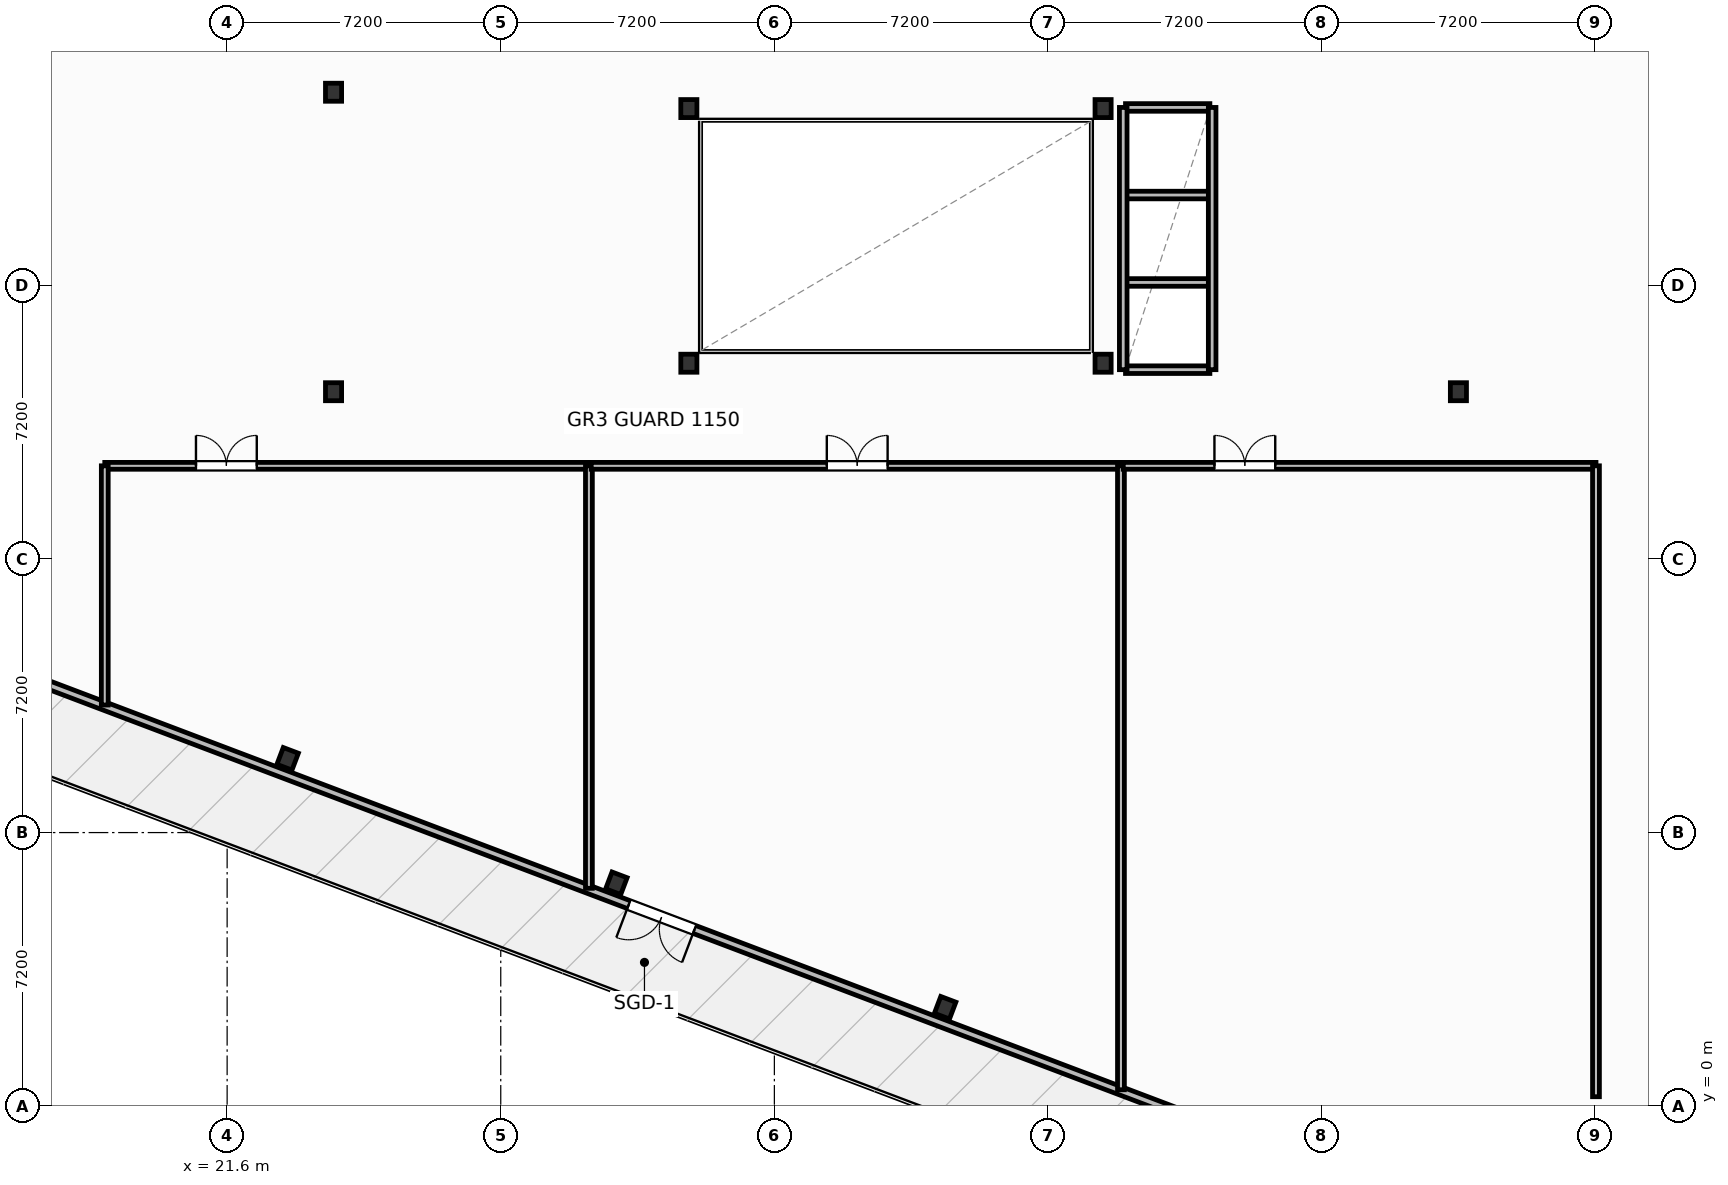
"""IFC4 building model, lengths in metres.
Left out: names, types, materials, properties, quantities, classifications, styles, units other than length and angle.
Written with IfcOpenShell. Run it as: python <this file> out.ifc"""

import sys

from ifc_helpers import new_model, si_unit, direction, frame, frame_2d, origin, origin_2d, place, context, subcontext, project, spatial, rectangle, i_section, extrude, element, fill, save


model = new_model("IFC4")
c1 = context("Model", 3, precision=1e-05, world=origin(), true_north=direction((0.0, 1.0)))
c2 = subcontext(c1, "Body", "Model", "MODEL_VIEW")
j1 = project(units=[si_unit("LENGTHUNIT", "METRE"), si_unit("PLANEANGLEUNIT", "RADIAN")], contexts=[c1])
p1 = place(None, origin())
s1 = spatial("IfcSite", under=j1, at=p1, CompositionType="ELEMENT")
p2 = place(p1, origin())
s2 = spatial("IfcBuilding", under=s1, at=p2, CompositionType="ELEMENT")
p3 = place(p2, frame((0.0, 0.0, 71.4)))
s3 = spatial("IfcBuildingStorey", under=s2, at=p3, CompositionType="ELEMENT", Elevation=71.4)
for number, where, z_axis, x_axis in (
    (1, (33.75, 19.55, 0.0), (0.0, 0.0, 1.0), (1.0, 0.0, 0.0)),
    (2, (44.65, 19.55, 0.0), (0.0, 0.0, 1.0), (1.0, 0.0, 0.0)),
    (3, (33.75, 26.25, 0.0), (0.0, 0.0, 1.0), (1.0, 0.0, 0.0)),
    (4, (44.65, 26.25, 0.0), (0.0, 0.0, 1.0), (1.0, 0.0, 0.0)),
    (5, (24.4, 18.8, 0.0), (0.0, 0.0, 1.0), (1.0, 0.0, 0.0)),
    (6, (24.4, 26.68, 0.0), (0.0, 0.0, 1.0), (1.0, 0.0, 0.0)),
    (7, (54.0, 18.8, 0.0), (0.0, 0.0, 1.0), (1.0, 0.0, 0.0)),
):
    element("IfcColumn", number, at=place(p3, frame(where, z_axis=z_axis, x_axis=x_axis)), inside=s3, PredefinedType="COLUMN", context=c2, shape_type="SweptSolid", body=[
        extrude(i_section(OverallWidth=0.424, OverallDepth=0.474, WebThickness=0.048, FlangeThickness=0.077, FilletRadius=0.025, at=origin_2d()), origin(), (0.0, 0.0, 1.0), 4.8),
    ])
for number, where, z_axis, x_axis in (
    (8, (23.192, 9.141, -0.32), (0.0, 0.0, 1.0), (0.935, -0.354, 0.0)),
    (9, (31.843, 5.866, -0.32), (0.0, 0.0, 1.0), (0.935, -0.354, 0.0)),
    (10, (40.493, 2.591, -0.32), (0.0, 0.0, 1.0), (0.935, -0.354, 0.0)),
):
    element("IfcColumn", number, at=place(p3, frame(where, z_axis=z_axis, x_axis=x_axis)), inside=s3, PredefinedType="COLUMN", context=c2, shape_type="SweptSolid", body=[
        extrude(i_section(OverallWidth=0.424, OverallDepth=0.474, WebThickness=0.048, FlangeThickness=0.077, FilletRadius=0.025, at=origin_2d()), origin(), (0.0, 0.0, 1.0), 5.12),
    ])
p4 = place(p3, frame((59.754, -5.139, 0.0), z_axis=(0.0, 0.0, 1.0), x_axis=(-0.935222250741, 0.354061211825, 0.0)))
e11 = element("IfcWall", 11, at=p4, inside=s3, PredefinedType="SOLIDWALL", context=c2, shape_type="SweptSolid", body=[
    extrude(rectangle(XDim=60.0, YDim=0.22, at=frame_2d((30.0, 0.0))), origin(), (0.0, 0.0, 1.0), 3.83),
])
p5 = place(p4, frame((27.647, 0.0, 0.0)))
e12 = element("IfcOpeningElement", 12, at=p5, cuts=e11, PredefinedType="OPENING", context=c2, shape_type="SweptSolid", body=[
    extrude(rectangle(XDim=1.85, YDim=2.3, at=frame_2d((0.925, 1.15))), frame((0.0, 0.12, 0.0), z_axis=(0.0, -1.0, 0.0), x_axis=(1.0, 0.0, 0.0)), (0.0, 0.0, 1.0), 0.24),
])
p6 = place(p4, frame((0.55, 0.0, 0.75)))
e13 = element("IfcOpeningElement", 13, at=p6, cuts=e11, PredefinedType="OPENING", context=c2, shape_type="SweptSolid", body=[
    extrude(rectangle(XDim=1.65, YDim=1.65, at=frame_2d((0.825, 0.825))), frame((0.0, 0.12, 0.0), z_axis=(0.0, -1.0, 0.0), x_axis=(1.0, 0.0, 0.0)), (0.0, 0.0, 1.0), 0.24),
])
p7 = place(p4, frame((57.8, 0.0, 0.75)))
e14 = element("IfcOpeningElement", 14, at=p7, cuts=e11, PredefinedType="OPENING", context=c2, shape_type="SweptSolid", body=[
    extrude(rectangle(XDim=1.65, YDim=1.65, at=frame_2d((0.825, 0.825))), frame((0.0, 0.12, 0.0), z_axis=(0.0, -1.0, 0.0), x_axis=(1.0, 0.0, 0.0)), (0.0, 0.0, 1.0), 0.24),
])
p8 = place(p3, frame((18.38, 16.85, 0.0), z_axis=(0.0, 0.0, 1.0), x_axis=(1.0, 0.0, 0.0)))
e15 = element("IfcWall", 15, at=p8, inside=s3, PredefinedType="PARTITIONING", context=c2, shape_type="SweptSolid", body=[
    extrude(rectangle(XDim=12.74, YDim=0.18, at=frame_2d((6.37, 0.0))), origin(), (0.0, 0.0, 1.0), 4.55),
])
p9 = place(p8, frame((2.4, 0.0, 0.0)))
e16 = element("IfcOpeningElement", 16, at=p9, cuts=e15, PredefinedType="OPENING", context=c2, shape_type="SweptSolid", body=[
    extrude(rectangle(XDim=1.6, YDim=2.05, at=frame_2d((0.8, 1.025))), frame((0.0, 0.1, 0.0), z_axis=(0.0, -1.0, 0.0), x_axis=(1.0, 0.0, 0.0)), (0.0, 0.0, 1.0), 0.2),
])
p10 = place(p3, frame((31.12, 5.733, 0.0), z_axis=(0.0, 0.0, 1.0), x_axis=(0.0, 1.0, 0.0)))
e17 = element("IfcWall", 17, at=p10, inside=s3, PredefinedType="PARTITIONING", context=c2, shape_type="SweptSolid", body=[
    extrude(rectangle(XDim=11.117, YDim=0.18, at=frame_2d((5.558, 0.0))), origin(), (0.0, 0.0, 1.0), 4.55),
])
p11 = place(p3, frame((18.38, 10.557, 0.0), z_axis=(0.0, 0.0, 1.0), x_axis=(0.0, 1.0, 0.0)))
e18 = element("IfcWall", 18, at=p11, inside=s3, PredefinedType="PARTITIONING", context=c2, shape_type="SweptSolid", body=[
    extrude(rectangle(XDim=6.293, YDim=0.18, at=frame_2d((3.147, 0.0))), origin(), (0.0, 0.0, 1.0), 4.55),
])
p12 = place(p3, frame((31.18, 16.85, 0.0), z_axis=(0.0, 0.0, 1.0), x_axis=(1.0, 0.0, 0.0)))
e19 = element("IfcWall", 19, at=p12, inside=s3, PredefinedType="PARTITIONING", context=c2, shape_type="SweptSolid", body=[
    extrude(rectangle(XDim=13.94, YDim=0.18, at=frame_2d((6.97, 0.0))), origin(), (0.0, 0.0, 1.0), 4.55),
])
p13 = place(p12, frame((6.2, 0.0, 0.0)))
e20 = element("IfcOpeningElement", 20, at=p13, cuts=e19, PredefinedType="OPENING", context=c2, shape_type="SweptSolid", body=[
    extrude(rectangle(XDim=1.6, YDim=2.05, at=frame_2d((0.8, 1.025))), frame((0.0, 0.1, 0.0), z_axis=(0.0, -1.0, 0.0), x_axis=(1.0, 0.0, 0.0)), (0.0, 0.0, 1.0), 0.2),
])
p14 = place(p3, frame((45.12, 0.433, 0.0), z_axis=(0.0, 0.0, 1.0), x_axis=(0.0, 1.0, 0.0)))
e21 = element("IfcWall", 21, at=p14, inside=s3, PredefinedType="PARTITIONING", context=c2, shape_type="SweptSolid", body=[
    extrude(rectangle(XDim=16.417, YDim=0.18, at=frame_2d((8.208, 0.0))), origin(), (0.0, 0.0, 1.0), 4.55),
])
p15 = place(p3, frame((45.18, 16.85, 0.0), z_axis=(0.0, 0.0, 1.0), x_axis=(1.0, 0.0, 0.0)))
e22 = element("IfcWall", 22, at=p15, inside=s3, PredefinedType="PARTITIONING", context=c2, shape_type="SweptSolid", body=[
    extrude(rectangle(XDim=12.44, YDim=0.18, at=frame_2d((6.22, 0.0))), origin(), (0.0, 0.0, 1.0), 4.55),
])
p16 = place(p15, frame((2.4, 0.0, 0.0)))
e23 = element("IfcOpeningElement", 23, at=p16, cuts=e22, PredefinedType="OPENING", context=c2, shape_type="SweptSolid", body=[
    extrude(rectangle(XDim=1.6, YDim=2.05, at=frame_2d((0.8, 1.025))), frame((0.0, 0.1, 0.0), z_axis=(0.0, -1.0, 0.0), x_axis=(1.0, 0.0, 0.0)), (0.0, 0.0, 1.0), 0.2),
])
p17 = place(p3, frame((57.62, 0.25, 0.0), z_axis=(0.0, 0.0, 1.0), x_axis=(0.0, 1.0, 0.0)))
e24 = element("IfcWall", 24, at=p17, inside=s3, PredefinedType="PARTITIONING", context=c2, shape_type="SweptSolid", body=[
    extrude(rectangle(XDim=16.6, YDim=0.18, at=frame_2d((8.3, 0.0))), origin(), (0.0, 0.0, 1.0), 4.55),
])
for number, where, z_axis, x_axis in (
    (25, (45.24, 21.675, 0.0), (0.0, 0.0, 1.0), (1.0, 0.0, 0.0)),
    (26, (45.24, 23.975, 0.0), (0.0, 0.0, 1.0), (1.0, 0.0, 0.0)),
):
    element("IfcWall", number, at=place(p3, frame(where, z_axis=z_axis, x_axis=x_axis)), inside=s3, PredefinedType="PARTITIONING", context=c2, shape_type="SweptSolid", body=[
        extrude(rectangle(XDim=2.22, YDim=0.2, at=frame_2d((1.11, 0.0))), origin(), (0.0, 0.0, 1.0), 4.55),
    ])
p18 = place(p3, frame((45.24, 19.38, 0.0), z_axis=(0.0, 0.0, 1.0), x_axis=(1.0, 0.0, 0.0)))
e27 = element("IfcWall", 27, at=p18, inside=s3, PredefinedType="PARTITIONING", context=c2, shape_type="SweptSolid", body=[
    extrude(rectangle(XDim=2.22, YDim=0.2, at=frame_2d((1.11, 0.0))), origin(), (0.0, 0.0, 1.0), 3.762),
])
p19 = place(p3, frame((45.24, 26.28, 0.0), z_axis=(0.0, 0.0, 1.0), x_axis=(1.0, 0.0, 0.0)))
e28 = element("IfcWall", 28, at=p19, inside=s3, PredefinedType="PARTITIONING", context=c2, shape_type="SweptSolid", body=[
    extrude(rectangle(XDim=2.22, YDim=0.2, at=frame_2d((1.11, 0.0))), origin(), (0.0, 0.0, 1.0), 4.55),
])
for number, where, z_axis, x_axis in (
    (29, (45.18, 19.38, 0.0), (0.0, 0.0, 1.0), (0.0, 1.0, 0.0)),
    (30, (47.52, 19.38, 0.0), (0.0, 0.0, 1.0), (0.0, 1.0, 0.0)),
):
    element("IfcWall", number, at=place(p3, frame(where, z_axis=z_axis, x_axis=x_axis)), inside=s3, PredefinedType="PARTITIONING", context=c2, shape_type="SweptSolid", body=[
        extrude(rectangle(XDim=6.9, YDim=0.2, at=frame_2d((3.45, 0.0))), origin(), (0.0, 0.0, 1.0), 4.55),
    ])
p20 = place(p5, origin())
e31 = element("IfcDoor", 31, at=p20, inside=s3, OperationType="DOUBLE_DOOR_SINGLE_SWING", PredefinedType="DOOR", context=c2, shape_type="SweptSolid", body=[
    extrude(rectangle(XDim=1.85, YDim=2.3, at=frame_2d((0.925, 1.15))), frame((0.0, 0.025, 0.0), z_axis=(0.0, -1.0, 0.0), x_axis=(1.0, 0.0, 0.0)), (0.0, 0.0, 1.0), 0.05),
])
fill(e12, e31)
p21 = place(p9, origin())
e32 = element("IfcDoor", 32, at=p21, inside=s3, OperationType="DOUBLE_DOOR_SINGLE_SWING", PredefinedType="DOOR", context=c2, shape_type="SweptSolid", body=[
    extrude(rectangle(XDim=1.6, YDim=2.05, at=frame_2d((0.8, 1.025))), frame((0.0, 0.025, 0.0), z_axis=(0.0, -1.0, 0.0), x_axis=(1.0, 0.0, 0.0)), (0.0, 0.0, 1.0), 0.05),
])
fill(e16, e32)
p22 = place(p13, origin())
e33 = element("IfcDoor", 33, at=p22, inside=s3, OperationType="DOUBLE_DOOR_SINGLE_SWING", PredefinedType="DOOR", context=c2, shape_type="SweptSolid", body=[
    extrude(rectangle(XDim=1.6, YDim=2.05, at=frame_2d((0.8, 1.025))), frame((0.0, 0.025, 0.0), z_axis=(0.0, -1.0, 0.0), x_axis=(1.0, 0.0, 0.0)), (0.0, 0.0, 1.0), 0.05),
])
fill(e20, e33)
p23 = place(p16, origin())
e34 = element("IfcDoor", 34, at=p23, inside=s3, OperationType="DOUBLE_DOOR_SINGLE_SWING", PredefinedType="DOOR", context=c2, shape_type="SweptSolid", body=[
    extrude(rectangle(XDim=1.6, YDim=2.05, at=frame_2d((0.8, 1.025))), frame((0.0, 0.025, 0.0), z_axis=(0.0, -1.0, 0.0), x_axis=(1.0, 0.0, 0.0)), (0.0, 0.0, 1.0), 0.05),
])
fill(e23, e34)
save(model, sys.argv[1])
